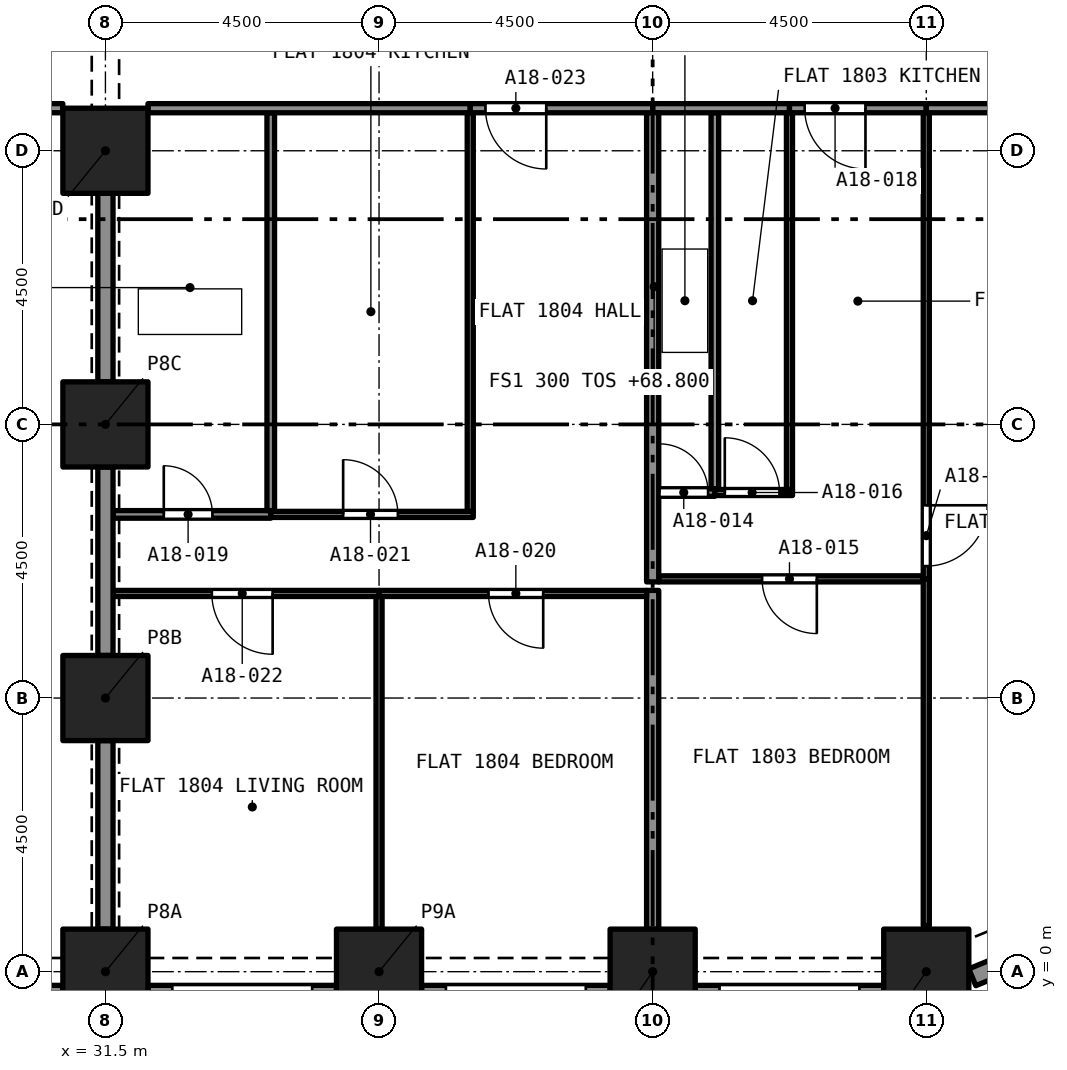
"""IFC4 building model, lengths in metres.
Left out: names, types, materials, properties, quantities, classifications, styles, units other than length and angle.
Written with IfcOpenShell. Run it as: python <this file> out.ifc"""

import sys

from ifc_helpers import new_model, si_unit, direction, frame, frame_2d, origin, origin_2d, place, context, subcontext, project, spatial, rectangle, extrude, element, fill, save


model = new_model("IFC4")
c1 = context("Model", 3, precision=1e-05, world=origin(), true_north=direction((0.0, 1.0)))
c2 = subcontext(c1, "Body", "Model", "MODEL_VIEW")
j1 = project(units=[si_unit("LENGTHUNIT", "METRE"), si_unit("PLANEANGLEUNIT", "RADIAN")], contexts=[c1])
p1 = place(None, origin())
s1 = spatial("IfcSite", under=j1, at=p1, CompositionType="ELEMENT")
p2 = place(p1, origin())
s2 = spatial("IfcBuilding", under=s1, at=p2, CompositionType="ELEMENT")
p3 = place(p2, frame((0.0, 0.0, 68.8)))
s3 = spatial("IfcBuildingStorey", under=s2, at=p3, CompositionType="ELEMENT", Elevation=68.8)
for number, where, z_axis, x_axis in (
    (1, (31.5, 0.0, 0.0), (0.0, 0.0, 1.0), (1.0, 0.0, 0.0)),
    (2, (36.0, 0.0, 0.0), (0.0, 0.0, 1.0), (1.0, 0.0, 0.0)),
    (3, (40.5, 0.0, 0.0), (0.0, 0.0, 1.0), (1.0, 0.0, 0.0)),
    (4, (45.0, 0.0, 0.0), (0.0, 0.0, 1.0), (1.0, 0.0, 0.0)),
    (5, (31.5, 4.5, 0.0), (0.0, 0.0, 1.0), (1.0, 0.0, 0.0)),
    (6, (31.5, 9.0, 0.0), (0.0, 0.0, 1.0), (1.0, 0.0, 0.0)),
    (7, (31.5, 13.5, 0.0), (0.0, 0.0, 1.0), (1.0, 0.0, 0.0)),
):
    element("IfcColumn", number, at=place(p3, frame(where, z_axis=z_axis, x_axis=x_axis)), inside=s3, PredefinedType="COLUMN", context=c2, shape_type="SweptSolid", body=[
        extrude(rectangle(XDim=1.4, YDim=1.4, at=origin_2d()), origin(), (0.0, 0.0, 1.0), 3.2),
    ])
p4 = place(p3, frame((30.8, -0.375, 0.0), z_axis=(0.0, 0.0, 1.0), x_axis=(-1.0, 0.0, 0.0)))
e8 = element("IfcWall", 8, at=p4, inside=s3, PredefinedType="SOLIDWALL", context=c2, shape_type="SweptSolid", body=[
    extrude(rectangle(XDim=3.1, YDim=0.3, at=frame_2d((1.55, 0.0))), origin(), (0.0, 0.0, 1.0), 3.2),
])
p5 = place(p4, frame((0.4, 0.0, 0.45)))
e9 = element("IfcOpeningElement", 9, at=p5, cuts=e8, PredefinedType="OPENING", context=c2, shape_type="SweptSolid", body=[
    extrude(rectangle(XDim=2.3, YDim=1.95, at=frame_2d((1.15, 0.975))), frame((0.0, 0.16, 0.0), z_axis=(0.0, -1.0, 0.0), x_axis=(1.0, 0.0, 0.0)), (0.0, 0.0, 1.0), 0.32),
])
p6 = place(p3, frame((35.3, -0.375, 0.0), z_axis=(0.0, 0.0, 1.0), x_axis=(-1.0, 0.0, 0.0)))
e10 = element("IfcWall", 10, at=p6, inside=s3, PredefinedType="SOLIDWALL", context=c2, shape_type="SweptSolid", body=[
    extrude(rectangle(XDim=3.1, YDim=0.3, at=frame_2d((1.55, 0.0))), origin(), (0.0, 0.0, 1.0), 3.2),
])
p7 = place(p6, frame((0.4, 0.0, 0.45)))
e11 = element("IfcOpeningElement", 11, at=p7, cuts=e10, PredefinedType="OPENING", context=c2, shape_type="SweptSolid", body=[
    extrude(rectangle(XDim=2.3, YDim=1.95, at=frame_2d((1.15, 0.975))), frame((0.0, 0.16, 0.0), z_axis=(0.0, -1.0, 0.0), x_axis=(1.0, 0.0, 0.0)), (0.0, 0.0, 1.0), 0.32),
])
p8 = place(p3, frame((39.8, -0.375, 0.0), z_axis=(0.0, 0.0, 1.0), x_axis=(-1.0, 0.0, 0.0)))
e12 = element("IfcWall", 12, at=p8, inside=s3, PredefinedType="SOLIDWALL", context=c2, shape_type="SweptSolid", body=[
    extrude(rectangle(XDim=3.1, YDim=0.3, at=frame_2d((1.55, 0.0))), origin(), (0.0, 0.0, 1.0), 3.2),
])
p9 = place(p8, frame((0.4, 0.0, 0.45)))
e13 = element("IfcOpeningElement", 13, at=p9, cuts=e12, PredefinedType="OPENING", context=c2, shape_type="SweptSolid", body=[
    extrude(rectangle(XDim=2.3, YDim=1.95, at=frame_2d((1.15, 0.975))), frame((0.0, 0.16, 0.0), z_axis=(0.0, -1.0, 0.0), x_axis=(1.0, 0.0, 0.0)), (0.0, 0.0, 1.0), 0.32),
])
p10 = place(p3, frame((44.3, -0.375, 0.0), z_axis=(0.0, 0.0, 1.0), x_axis=(-1.0, 0.0, 0.0)))
e14 = element("IfcWall", 14, at=p10, inside=s3, PredefinedType="SOLIDWALL", context=c2, shape_type="SweptSolid", body=[
    extrude(rectangle(XDim=3.1, YDim=0.3, at=frame_2d((1.55, 0.0))), origin(), (0.0, 0.0, 1.0), 3.2),
])
p11 = place(p10, frame((0.4, 0.0, 0.45)))
e15 = element("IfcOpeningElement", 15, at=p11, cuts=e14, PredefinedType="OPENING", context=c2, shape_type="SweptSolid", body=[
    extrude(rectangle(XDim=2.3, YDim=1.95, at=frame_2d((1.15, 0.975))), frame((0.0, 0.16, 0.0), z_axis=(0.0, -1.0, 0.0), x_axis=(1.0, 0.0, 0.0)), (0.0, 0.0, 1.0), 0.32),
])
p12 = place(p3, frame((47.48, 0.622, 0.0), z_axis=(0.0, 0.0, 1.0), x_axis=(-0.923903565336, -0.38262540684, 0.0)))
e16 = element("IfcWall", 16, at=p12, inside=s3, PredefinedType="SOLIDWALL", context=c2, shape_type="SweptSolid", body=[
    extrude(rectangle(XDim=1.865, YDim=0.3, at=frame_2d((0.933, 0.0))), origin(), (0.0, 0.0, 1.0), 3.2),
])
p13 = place(p12, frame((0.258, 0.0, 0.45)))
e17 = element("IfcOpeningElement", 17, at=p13, cuts=e16, PredefinedType="OPENING", context=c2, shape_type="SweptSolid", body=[
    extrude(rectangle(XDim=1.1, YDim=1.95, at=frame_2d((0.55, 0.975))), frame((0.0, 0.16, 0.0), z_axis=(0.0, -1.0, 0.0), x_axis=(1.0, 0.0, 0.0)), (0.0, 0.0, 1.0), 0.32),
])
p14 = place(p3, frame((40.6, 7.88, 0.0), z_axis=(0.0, 0.0, 1.0), x_axis=(1.0, 0.0, 0.0)))
e18 = element("IfcWall", 18, at=p14, inside=s3, PredefinedType="PARTITIONING", context=c2, shape_type="SweptSolid", body=[
    extrude(rectangle(XDim=0.923, YDim=0.125, at=frame_2d((0.461, 0.0))), origin(), (0.0, 0.0, 1.0), 2.9),
])
p15 = place(p14, frame((0.011, 0.0, 0.0)))
e19 = element("IfcOpeningElement", 19, at=p15, cuts=e18, PredefinedType="OPENING", context=c2, shape_type="SweptSolid", body=[
    extrude(rectangle(XDim=0.8, YDim=2.1, at=frame_2d((0.4, 1.05))), frame((0.0, 0.073, 0.0), z_axis=(0.0, -1.0, 0.0), x_axis=(1.0, 0.0, 0.0)), (0.0, 0.0, 1.0), 0.145),
])
p16 = place(p3, frame((41.523, 7.942, 0.0), z_axis=(0.0, 0.0, 1.0), x_axis=(0.0, 1.0, 0.0)))
e20 = element("IfcWall", 20, at=p16, inside=s3, PredefinedType="PARTITIONING", context=c2, shape_type="SweptSolid", body=[
    extrude(rectangle(XDim=6.183, YDim=0.125, at=frame_2d((3.091, 0.0))), origin(), (0.0, 0.0, 1.0), 2.9),
])
p17 = place(p3, frame((40.5, 14.2, 0.0), z_axis=(0.0, 0.0, 1.0), x_axis=(1.0, 0.0, 0.0)))
e21 = element("IfcWall", 21, at=p17, inside=s3, PredefinedType="PARTITIONING", context=c2, shape_type="SweptSolid", body=[
    extrude(rectangle(XDim=2.25, YDim=0.15, at=frame_2d((1.125, 0.0))), origin(), (0.0, 0.0, 1.0), 2.9),
])
p18 = place(p3, frame((44.95, 6.46, 0.0), z_axis=(0.0, 0.0, 1.0), x_axis=(-1.0, 0.0, 0.0)))
e22 = element("IfcWall", 22, at=p18, inside=s3, PredefinedType="PARTITIONING", context=c2, shape_type="SweptSolid", body=[
    extrude(rectangle(XDim=4.35, YDim=0.1, at=frame_2d((2.175, 0.0))), origin(), (0.0, 0.0, 1.0), 2.9),
])
p19 = place(p18, frame((1.75, 0.0, 0.0)))
e23 = element("IfcOpeningElement", 23, at=p19, cuts=e22, PredefinedType="OPENING", context=c2, shape_type="SweptSolid", body=[
    extrude(rectangle(XDim=0.9, YDim=2.1, at=frame_2d((0.45, 1.05))), frame((0.0, 0.06, 0.0), z_axis=(0.0, -1.0, 0.0), x_axis=(1.0, 0.0, 0.0)), (0.0, 0.0, 1.0), 0.12),
])
p20 = place(p3, frame((45.0, 0.758, 0.0), z_axis=(0.0, 0.0, 1.0), x_axis=(0.0, 1.0, 0.0)))
e24 = element("IfcWall", 24, at=p20, inside=s3, PredefinedType="PARTITIONING", context=c2, shape_type="SweptSolid", body=[
    extrude(rectangle(XDim=5.702, YDim=0.1, at=frame_2d((2.851, 0.0))), origin(), (0.0, 0.0, 1.0), 2.9),
])
p21 = place(p3, frame((40.5, 0.7, 0.0), z_axis=(0.0, 0.0, 1.0), x_axis=(0.0, 1.0, 0.0)))
e25 = element("IfcWall", 25, at=p21, inside=s3, PredefinedType="PARTITIONING", context=c2, shape_type="SweptSolid", body=[
    extrude(rectangle(XDim=5.57, YDim=0.2, at=frame_2d((2.785, 0.0))), origin(), (0.0, 0.0, 1.0), 2.9),
])
p22 = place(p3, frame((41.523, 7.88, 0.0), z_axis=(0.0, 0.0, 1.0), x_axis=(1.0, 0.0, 0.0)))
e26 = element("IfcWall", 26, at=p22, inside=s3, PredefinedType="PARTITIONING", context=c2, shape_type="SweptSolid", body=[
    extrude(rectangle(XDim=1.277, YDim=0.1, at=frame_2d((0.639, 0.0))), origin(), (0.0, 0.0, 1.0), 2.9),
])
p23 = place(p22, frame((0.164, 0.0, 0.0)))
e27 = element("IfcOpeningElement", 27, at=p23, cuts=e26, PredefinedType="OPENING", context=c2, shape_type="SweptSolid", body=[
    extrude(rectangle(XDim=0.9, YDim=2.1, at=frame_2d((0.45, 1.05))), frame((0.0, 0.06, 0.0), z_axis=(0.0, -1.0, 0.0), x_axis=(1.0, 0.0, 0.0)), (0.0, 0.0, 1.0), 0.12),
])
p24 = place(p3, frame((42.75, 7.93, 0.0), z_axis=(0.0, 0.0, 1.0), x_axis=(0.0, 1.0, 0.0)))
e28 = element("IfcWall", 28, at=p24, inside=s3, PredefinedType="PARTITIONING", context=c2, shape_type="SweptSolid", body=[
    extrude(rectangle(XDim=6.195, YDim=0.1, at=frame_2d((3.098, 0.0))), origin(), (0.0, 0.0, 1.0), 2.9),
])
p25 = place(p3, frame((45.0, 14.125, 0.0), z_axis=(0.0, 0.0, 1.0), x_axis=(0.0, -1.0, 0.0)))
e29 = element("IfcWall", 29, at=p25, inside=s3, PredefinedType="PARTITIONING", context=c2, shape_type="SweptSolid", body=[
    extrude(rectangle(XDim=7.665, YDim=0.1, at=frame_2d((3.833, 0.0))), origin(), (0.0, 0.0, 1.0), 2.9),
])
p26 = place(p25, frame((6.455, 0.0, 0.0)))
e30 = element("IfcOpeningElement", 30, at=p26, cuts=e29, PredefinedType="OPENING", context=c2, shape_type="SweptSolid", body=[
    extrude(rectangle(XDim=1.0, YDim=2.1, at=frame_2d((0.5, 1.05))), frame((0.0, 0.06, 0.0), z_axis=(0.0, -1.0, 0.0), x_axis=(1.0, 0.0, 0.0)), (0.0, 0.0, 1.0), 0.12),
])
p27 = place(p3, frame((40.5, 6.41, 0.0), z_axis=(0.0, 0.0, 1.0), x_axis=(0.0, 1.0, 0.0)))
e31 = element("IfcWall", 31, at=p27, inside=s3, PredefinedType="PARTITIONING", context=c2, shape_type="SweptSolid", body=[
    extrude(rectangle(XDim=7.715, YDim=0.2, at=frame_2d((3.857, 0.0))), origin(), (0.0, 0.0, 1.0), 2.9),
])
p28 = place(p3, frame((45.0, 14.2, 0.0), z_axis=(0.0, 0.0, 1.0), x_axis=(-1.0, 0.0, 0.0)))
e32 = element("IfcWall", 32, at=p28, inside=s3, PredefinedType="PARTITIONING", context=c2, shape_type="SweptSolid", body=[
    extrude(rectangle(XDim=2.25, YDim=0.15, at=frame_2d((1.125, 0.0))), origin(), (0.0, 0.0, 1.0), 2.9),
])
p29 = place(p28, frame((1.0, 0.0, 0.0)))
e33 = element("IfcOpeningElement", 33, at=p29, cuts=e32, PredefinedType="OPENING", context=c2, shape_type="SweptSolid", body=[
    extrude(rectangle(XDim=1.0, YDim=2.1, at=frame_2d((0.5, 1.05))), frame((0.0, 0.085, 0.0), z_axis=(0.0, -1.0, 0.0), x_axis=(1.0, 0.0, 0.0)), (0.0, 0.0, 1.0), 0.17),
])
p30 = place(p3, frame((45.0, 14.2, 0.0), z_axis=(0.0, 0.0, 1.0), x_axis=(1.0, 0.0, 0.0)))
e34 = element("IfcWall", 34, at=p30, inside=s3, PredefinedType="PARTITIONING", context=c2, shape_type="SweptSolid", body=[
    extrude(rectangle(XDim=3.8, YDim=0.15, at=frame_2d((1.9, 0.0))), origin(), (0.0, 0.0, 1.0), 2.9),
])
p31 = place(p3, frame((31.625, 7.52, 0.0), z_axis=(0.0, 0.0, 1.0), x_axis=(1.0, 0.0, 0.0)))
e35 = element("IfcWall", 35, at=p31, inside=s3, PredefinedType="PARTITIONING", context=c2, shape_type="SweptSolid", body=[
    extrude(rectangle(XDim=2.594, YDim=0.125, at=frame_2d((1.297, 0.0))), origin(), (0.0, 0.0, 1.0), 2.9),
])
p32 = place(p31, frame((0.835, 0.0, 0.0)))
e36 = element("IfcOpeningElement", 36, at=p32, cuts=e35, PredefinedType="OPENING", context=c2, shape_type="SweptSolid", body=[
    extrude(rectangle(XDim=0.8, YDim=2.1, at=frame_2d((0.4, 1.05))), frame((0.0, 0.073, 0.0), z_axis=(0.0, -1.0, 0.0), x_axis=(1.0, 0.0, 0.0)), (0.0, 0.0, 1.0), 0.145),
])
p33 = place(p3, frame((34.219, 7.583, 0.0), z_axis=(0.0, 0.0, 1.0), x_axis=(0.0, 1.0, 0.0)))
e37 = element("IfcWall", 37, at=p33, inside=s3, PredefinedType="PARTITIONING", context=c2, shape_type="SweptSolid", body=[
    extrude(rectangle(XDim=6.542, YDim=0.125, at=frame_2d((3.271, 0.0))), origin(), (0.0, 0.0, 1.0), 2.9),
])
p34 = place(p3, frame((31.5, 9.7, 0.0), z_axis=(0.0, 0.0, 1.0), x_axis=(0.0, 1.0, 0.0)))
e38 = element("IfcWall", 38, at=p34, inside=s3, PredefinedType="PARTITIONING", context=c2, shape_type="SweptSolid", body=[
    extrude(rectangle(XDim=3.1, YDim=0.25, at=frame_2d((1.55, 0.0))), origin(), (0.0, 0.0, 1.0), 2.38),
])
p35 = place(p3, frame((32.2, 14.2, 0.0), z_axis=(0.0, 0.0, 1.0), x_axis=(1.0, 0.0, 0.0)))
e39 = element("IfcWall", 39, at=p35, inside=s3, PredefinedType="PARTITIONING", context=c2, shape_type="SweptSolid", body=[
    extrude(rectangle(XDim=5.3, YDim=0.15, at=frame_2d((2.65, 0.0))), origin(), (0.0, 0.0, 1.0), 2.9),
])
p36 = place(p3, frame((40.4, 6.22, 0.0), z_axis=(0.0, 0.0, 1.0), x_axis=(-1.0, 0.0, 0.0)))
e40 = element("IfcWall", 40, at=p36, inside=s3, PredefinedType="PARTITIONING", context=c2, shape_type="SweptSolid", body=[
    extrude(rectangle(XDim=4.4, YDim=0.1, at=frame_2d((2.2, 0.0))), origin(), (0.0, 0.0, 1.0), 2.9),
])
p37 = place(p36, frame((1.7, 0.0, 0.0)))
e41 = element("IfcOpeningElement", 41, at=p37, cuts=e40, PredefinedType="OPENING", context=c2, shape_type="SweptSolid", body=[
    extrude(rectangle(XDim=0.9, YDim=2.1, at=frame_2d((0.45, 1.05))), frame((0.0, 0.06, 0.0), z_axis=(0.0, -1.0, 0.0), x_axis=(1.0, 0.0, 0.0)), (0.0, 0.0, 1.0), 0.12),
])
p38 = place(p3, frame((36.0, 0.7, 0.0), z_axis=(0.0, 0.0, 1.0), x_axis=(0.0, 1.0, 0.0)))
e42 = element("IfcWall", 42, at=p38, inside=s3, PredefinedType="PARTITIONING", context=c2, shape_type="SweptSolid", body=[
    extrude(rectangle(XDim=5.47, YDim=0.1, at=frame_2d((2.735, 0.0))), origin(), (0.0, 0.0, 1.0), 2.9),
])
p39 = place(p3, frame((34.219, 7.52, 0.0), z_axis=(0.0, 0.0, 1.0), x_axis=(1.0, 0.0, 0.0)))
e43 = element("IfcWall", 43, at=p39, inside=s3, PredefinedType="PARTITIONING", context=c2, shape_type="SweptSolid", body=[
    extrude(rectangle(XDim=3.331, YDim=0.1, at=frame_2d((1.666, 0.0))), origin(), (0.0, 0.0, 1.0), 2.9),
])
p40 = place(p39, frame((1.19, 0.0, 0.0)))
e44 = element("IfcOpeningElement", 44, at=p40, cuts=e43, PredefinedType="OPENING", context=c2, shape_type="SweptSolid", body=[
    extrude(rectangle(XDim=0.9, YDim=2.1, at=frame_2d((0.45, 1.05))), frame((0.0, 0.06, 0.0), z_axis=(0.0, -1.0, 0.0), x_axis=(1.0, 0.0, 0.0)), (0.0, 0.0, 1.0), 0.12),
])
p41 = place(p3, frame((37.5, 7.57, 0.0), z_axis=(0.0, 0.0, 1.0), x_axis=(0.0, 1.0, 0.0)))
e45 = element("IfcWall", 45, at=p41, inside=s3, PredefinedType="PARTITIONING", context=c2, shape_type="SweptSolid", body=[
    extrude(rectangle(XDim=6.555, YDim=0.1, at=frame_2d((3.277, 0.0))), origin(), (0.0, 0.0, 1.0), 2.9),
])
p42 = place(p3, frame((36.0, 6.22, 0.0), z_axis=(0.0, 0.0, 1.0), x_axis=(-1.0, 0.0, 0.0)))
e46 = element("IfcWall", 46, at=p42, inside=s3, PredefinedType="PARTITIONING", context=c2, shape_type="SweptSolid", body=[
    extrude(rectangle(XDim=4.375, YDim=0.1, at=frame_2d((2.188, 0.0))), origin(), (0.0, 0.0, 1.0), 2.9),
])
p43 = place(p42, frame((1.75, 0.0, 0.0)))
e47 = element("IfcOpeningElement", 47, at=p43, cuts=e46, PredefinedType="OPENING", context=c2, shape_type="SweptSolid", body=[
    extrude(rectangle(XDim=1.0, YDim=2.1, at=frame_2d((0.5, 1.05))), frame((0.0, 0.06, 0.0), z_axis=(0.0, -1.0, 0.0), x_axis=(1.0, 0.0, 0.0)), (0.0, 0.0, 1.0), 0.12),
])
p44 = place(p3, frame((40.5, 14.2, 0.0), z_axis=(0.0, 0.0, 1.0), x_axis=(-1.0, 0.0, 0.0)))
e48 = element("IfcWall", 48, at=p44, inside=s3, PredefinedType="PARTITIONING", context=c2, shape_type="SweptSolid", body=[
    extrude(rectangle(XDim=3.0, YDim=0.15, at=frame_2d((1.5, 0.0))), origin(), (0.0, 0.0, 1.0), 2.9),
])
p45 = place(p44, frame((1.75, 0.0, 0.0)))
e49 = element("IfcOpeningElement", 49, at=p45, cuts=e48, PredefinedType="OPENING", context=c2, shape_type="SweptSolid", body=[
    extrude(rectangle(XDim=1.0, YDim=2.1, at=frame_2d((0.5, 1.05))), frame((0.0, 0.085, 0.0), z_axis=(0.0, -1.0, 0.0), x_axis=(1.0, 0.0, 0.0)), (0.0, 0.0, 1.0), 0.17),
])
for number, where, z_axis, x_axis in (
    (50, (31.5, 0.7, 0.0), (0.0, 0.0, 1.0), (0.0, 1.0, 0.0)),
    (51, (31.5, 5.2, 0.0), (0.0, 0.0, 1.0), (0.0, 1.0, 0.0)),
):
    element("IfcWall", number, at=place(p3, frame(where, z_axis=z_axis, x_axis=x_axis)), inside=s3, PredefinedType="PARTITIONING", context=c2, shape_type="SweptSolid", body=[
        extrude(rectangle(XDim=3.1, YDim=0.25, at=frame_2d((1.55, 0.0))), origin(), (0.0, 0.0, 1.0), 2.38),
    ])
p46 = place(p3, frame((30.8, 14.2, 0.0), z_axis=(0.0, 0.0, 1.0), x_axis=(-1.0, 0.0, 0.0)))
e52 = element("IfcWall", 52, at=p46, inside=s3, PredefinedType="PARTITIONING", context=c2, shape_type="SweptSolid", body=[
    extrude(rectangle(XDim=8.3, YDim=0.15, at=frame_2d((4.15, 0.0))), origin(), (0.0, 0.0, 1.0), 2.75),
])
p47 = place(p46, frame((3.3, 0.0, 0.0)))
e53 = element("IfcOpeningElement", 53, at=p47, cuts=e52, PredefinedType="OPENING", context=c2, shape_type="SweptSolid", body=[
    extrude(rectangle(XDim=1.0, YDim=2.1, at=frame_2d((0.5, 1.05))), frame((0.0, 0.085, 0.0), z_axis=(0.0, -1.0, 0.0), x_axis=(1.0, 0.0, 0.0)), (0.0, 0.0, 1.0), 0.17),
])
p48 = place(p15, origin())
e54 = element("IfcDoor", 54, at=p48, inside=s3, OperationType="SINGLE_SWING_LEFT", PredefinedType="DOOR", context=c2, shape_type="SweptSolid", body=[
    extrude(rectangle(XDim=0.8, YDim=2.1, at=frame_2d((0.4, 1.05))), frame((0.0, 0.025, 0.0), z_axis=(0.0, -1.0, 0.0), x_axis=(1.0, 0.0, 0.0)), (0.0, 0.0, 1.0), 0.05),
])
fill(e19, e54)
p49 = place(p19, origin())
e55 = element("IfcDoor", 55, at=p49, inside=s3, OperationType="SINGLE_SWING_RIGHT", PredefinedType="DOOR", context=c2, shape_type="SweptSolid", body=[
    extrude(rectangle(XDim=0.9, YDim=2.1, at=frame_2d((0.45, 1.05))), frame((0.0, 0.025, 0.0), z_axis=(0.0, -1.0, 0.0), x_axis=(1.0, 0.0, 0.0)), (0.0, 0.0, 1.0), 0.05),
])
fill(e23, e55)
p50 = place(p23, origin())
e56 = element("IfcDoor", 56, at=p50, inside=s3, OperationType="SINGLE_SWING_LEFT", PredefinedType="DOOR", context=c2, shape_type="SweptSolid", body=[
    extrude(rectangle(XDim=0.9, YDim=2.1, at=frame_2d((0.45, 1.05))), frame((0.0, 0.025, 0.0), z_axis=(0.0, -1.0, 0.0), x_axis=(1.0, 0.0, 0.0)), (0.0, 0.0, 1.0), 0.05),
])
fill(e27, e56)
p51 = place(p26, origin())
e57 = element("IfcDoor", 57, at=p51, inside=s3, OperationType="SINGLE_SWING_RIGHT", PredefinedType="DOOR", context=c2, shape_type="SweptSolid", body=[
    extrude(rectangle(XDim=1.0, YDim=2.1, at=frame_2d((0.5, 1.05))), frame((0.0, 0.025, 0.0), z_axis=(0.0, -1.0, 0.0), x_axis=(1.0, 0.0, 0.0)), (0.0, 0.0, 1.0), 0.05),
])
fill(e30, e57)
p52 = place(p29, origin())
e58 = element("IfcDoor", 58, at=p52, inside=s3, OperationType="SINGLE_SWING_RIGHT", PredefinedType="DOOR", context=c2, shape_type="SweptSolid", body=[
    extrude(rectangle(XDim=1.0, YDim=2.1, at=frame_2d((0.5, 1.05))), frame((0.0, 0.025, 0.0), z_axis=(0.0, -1.0, 0.0), x_axis=(1.0, 0.0, 0.0)), (0.0, 0.0, 1.0), 0.05),
])
fill(e33, e58)
p53 = place(p32, origin())
e59 = element("IfcDoor", 59, at=p53, inside=s3, OperationType="SINGLE_SWING_LEFT", PredefinedType="DOOR", context=c2, shape_type="SweptSolid", body=[
    extrude(rectangle(XDim=0.8, YDim=2.1, at=frame_2d((0.4, 1.05))), frame((0.0, 0.025, 0.0), z_axis=(0.0, -1.0, 0.0), x_axis=(1.0, 0.0, 0.0)), (0.0, 0.0, 1.0), 0.05),
])
fill(e36, e59)
p54 = place(p37, origin())
e60 = element("IfcDoor", 60, at=p54, inside=s3, OperationType="SINGLE_SWING_LEFT", PredefinedType="DOOR", context=c2, shape_type="SweptSolid", body=[
    extrude(rectangle(XDim=0.9, YDim=2.1, at=frame_2d((0.45, 1.05))), frame((0.0, 0.025, 0.0), z_axis=(0.0, -1.0, 0.0), x_axis=(1.0, 0.0, 0.0)), (0.0, 0.0, 1.0), 0.05),
])
fill(e41, e60)
p55 = place(p40, origin())
e61 = element("IfcDoor", 61, at=p55, inside=s3, OperationType="SINGLE_SWING_LEFT", PredefinedType="DOOR", context=c2, shape_type="SweptSolid", body=[
    extrude(rectangle(XDim=0.9, YDim=2.1, at=frame_2d((0.45, 1.05))), frame((0.0, 0.025, 0.0), z_axis=(0.0, -1.0, 0.0), x_axis=(1.0, 0.0, 0.0)), (0.0, 0.0, 1.0), 0.05),
])
fill(e44, e61)
p56 = place(p43, origin())
e62 = element("IfcDoor", 62, at=p56, inside=s3, OperationType="SINGLE_SWING_RIGHT", PredefinedType="DOOR", context=c2, shape_type="SweptSolid", body=[
    extrude(rectangle(XDim=1.0, YDim=2.1, at=frame_2d((0.5, 1.05))), frame((0.0, 0.025, 0.0), z_axis=(0.0, -1.0, 0.0), x_axis=(1.0, 0.0, 0.0)), (0.0, 0.0, 1.0), 0.05),
])
fill(e47, e62)
p57 = place(p45, origin())
e63 = element("IfcDoor", 63, at=p57, inside=s3, OperationType="SINGLE_SWING_RIGHT", PredefinedType="DOOR", context=c2, shape_type="SweptSolid", body=[
    extrude(rectangle(XDim=1.0, YDim=2.1, at=frame_2d((0.5, 1.05))), frame((0.0, 0.025, 0.0), z_axis=(0.0, -1.0, 0.0), x_axis=(1.0, 0.0, 0.0)), (0.0, 0.0, 1.0), 0.05),
])
fill(e49, e63)
save(model, sys.argv[1])
